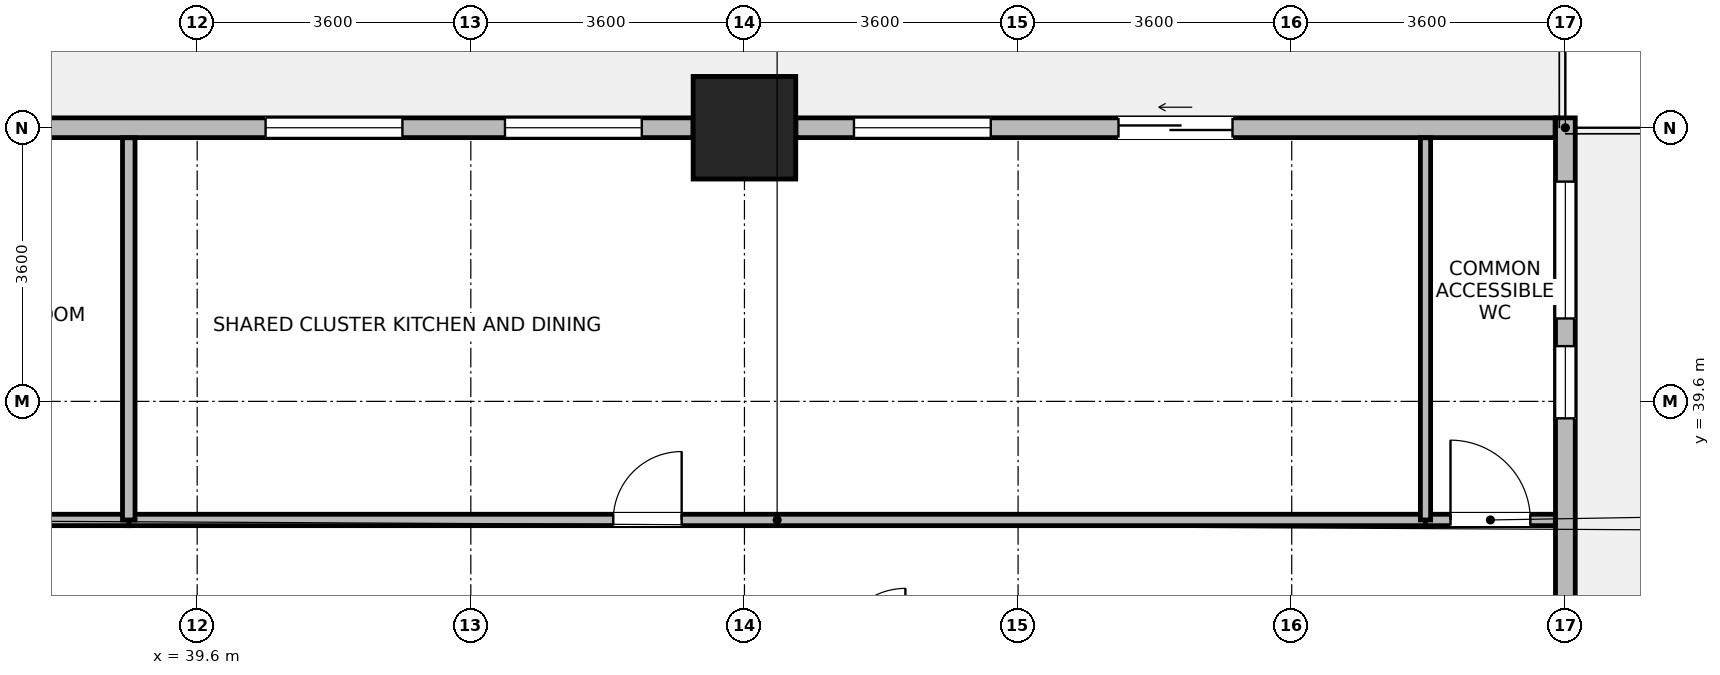
"""IFC4 building model, lengths in metres.
Left out: names, types, materials, properties, quantities, classifications, styles, units other than length and angle.
Written with IfcOpenShell. Run it as: python <this file> out.ifc"""

import sys

from ifc_helpers import new_model, si_unit, direction, frame, frame_2d, origin, origin_2d, place, context, subcontext, project, spatial, rectangle, extrude, source, transform, mapped, element, fill, save


model = new_model("IFC4")
c1 = context("Model", 3, precision=1e-05, world=origin(), true_north=direction((0.0, 1.0)))
c2 = subcontext(c1, "Body", "Model", "MODEL_VIEW")
j1 = project(units=[si_unit("LENGTHUNIT", "METRE"), si_unit("PLANEANGLEUNIT", "RADIAN")], contexts=[c1])
p1 = place(None, origin())
s1 = spatial("IfcSite", under=j1, at=p1, CompositionType="ELEMENT")
p2 = place(p1, origin())
s2 = spatial("IfcBuilding", under=s1, at=p2, CompositionType="ELEMENT")
p3 = place(p2, frame((0.0, 0.0, 29.0)))
s3 = spatial("IfcBuildingStorey", under=s2, at=p3, CompositionType="ELEMENT", Elevation=29.0)
m1 = source(origin(), c2, "Body", "SweptSolid", [
    extrude(rectangle(XDim=1.35, YDim=1.35, at=origin_2d()), origin(), (0.0, 0.0, 1.0), 3.7),
])
p4 = place(p3, frame((46.8, 43.2, 0.0), z_axis=(0.0, 0.0, 1.0), x_axis=(1.0, 0.0, 0.0)))
e1 = element("IfcColumn", 1, at=p4, inside=s3, PredefinedType="COLUMN", context=c2, shape_type="MappedRepresentation", body=[
    mapped(m1, transform((0.0, 0.0, 0.0), x_axis=(1.0, 0.0, 0.0), y_axis=(0.0, 1.0, 0.0), z_axis=(0.0, 0.0, 1.0), scale=1.0)),
])
p5 = place(p3, frame((57.6, 43.33, 0.0), z_axis=(0.0, 0.0, 1.0), x_axis=(0.0, -1.0, 0.0)))
e2 = element("IfcWall", 2, at=p5, inside=s3, PredefinedType="STANDARD", context=c2, shape_type="SweptSolid", body=[
    extrude(rectangle(XDim=6.956, YDim=0.26, at=frame_2d((3.478, 0.0))), origin(), (0.0, 0.0, 1.0), 3.43),
])
p6 = place(p5, frame((0.839, 0.0, 0.85)))
e3 = element("IfcOpeningElement", 3, at=p6, cuts=e2, PredefinedType="OPENING", context=c2, shape_type="SweptSolid", body=[
    extrude(rectangle(XDim=1.8, YDim=1.85, at=frame_2d((0.9, 0.925))), frame((0.0, 0.14, 0.0), z_axis=(0.0, -1.0, 0.0), x_axis=(1.0, 0.0, 0.0)), (0.0, 0.0, 1.0), 0.28),
])
p7 = place(p5, frame((3.003, 0.0, 0.85)))
e4 = element("IfcOpeningElement", 4, at=p7, cuts=e2, PredefinedType="OPENING", context=c2, shape_type="SweptSolid", body=[
    extrude(rectangle(XDim=0.95, YDim=1.75, at=frame_2d((0.475, 0.875))), frame((0.0, 0.14, 0.0), z_axis=(0.0, -1.0, 0.0), x_axis=(1.0, 0.0, 0.0)), (0.0, 0.0, 1.0), 0.28),
])
p8 = place(p3, frame((47.476, 43.2, 0.0), z_axis=(0.0, 0.0, 1.0), x_axis=(1.0, 0.0, 0.0)))
e5 = element("IfcWall", 5, at=p8, inside=s3, PredefinedType="STANDARD", context=c2, shape_type="SweptSolid", body=[
    extrude(rectangle(XDim=9.989, YDim=0.26, at=frame_2d((4.995, 0.0))), origin(), (0.0, 0.0, 1.0), 3.43),
])
p9 = place(p8, frame((4.245, 0.0, 0.0)))
e6 = element("IfcOpeningElement", 6, at=p9, cuts=e5, PredefinedType="OPENING", context=c2, shape_type="SweptSolid", body=[
    extrude(rectangle(XDim=1.5, YDim=2.15, at=frame_2d((0.75, 1.075))), frame((0.0, 0.14, 0.0), z_axis=(0.0, -1.0, 0.0), x_axis=(1.0, 0.0, 0.0)), (0.0, 0.0, 1.0), 0.28),
])
p10 = place(p8, frame((0.765, 0.0, 0.85)))
e7 = element("IfcOpeningElement", 7, at=p10, cuts=e5, PredefinedType="OPENING", context=c2, shape_type="SweptSolid", body=[
    extrude(rectangle(XDim=1.8, YDim=1.85, at=frame_2d((0.9, 0.925))), frame((0.0, 0.14, 0.0), z_axis=(0.0, -1.0, 0.0), x_axis=(1.0, 0.0, 0.0)), (0.0, 0.0, 1.0), 0.28),
])
p11 = place(p3, frame((36.676, 43.2, 0.0), z_axis=(0.0, 0.0, 1.0), x_axis=(1.0, 0.0, 0.0)))
e8 = element("IfcWall", 8, at=p11, inside=s3, PredefinedType="STANDARD", context=c2, shape_type="SweptSolid", body=[
    extrude(rectangle(XDim=9.448, YDim=0.26, at=frame_2d((4.724, 0.0))), origin(), (0.0, 0.0, 1.0), 2.93),
])
p12 = place(p11, frame((3.824, 0.0, 0.85)))
e9 = element("IfcOpeningElement", 9, at=p12, cuts=e8, PredefinedType="OPENING", context=c2, shape_type="SweptSolid", body=[
    extrude(rectangle(XDim=1.8, YDim=1.85, at=frame_2d((0.9, 0.925))), frame((0.0, 0.14, 0.0), z_axis=(0.0, -1.0, 0.0), x_axis=(1.0, 0.0, 0.0)), (0.0, 0.0, 1.0), 0.28),
])
p13 = place(p11, frame((6.973, 0.0, 0.85)))
e10 = element("IfcOpeningElement", 10, at=p13, cuts=e8, PredefinedType="OPENING", context=c2, shape_type="SweptSolid", body=[
    extrude(rectangle(XDim=1.8, YDim=1.85, at=frame_2d((0.9, 0.925))), frame((0.0, 0.14, 0.0), z_axis=(0.0, -1.0, 0.0), x_axis=(1.0, 0.0, 0.0)), (0.0, 0.0, 1.0), 0.28),
])
p14 = place(p3, frame((38.7, 38.04, 0.0), z_axis=(0.0, 0.0, 1.0), x_axis=(1.0, 0.0, 0.0)))
e11 = element("IfcWall", 11, at=p14, inside=s3, PredefinedType="PARTITIONING", context=c2, shape_type="SweptSolid", body=[
    extrude(rectangle(XDim=17.06, YDim=0.15, at=frame_2d((8.53, 0.0))), origin(), (0.0, 0.0, 1.0), 3.43),
])
p15 = place(p14, frame((6.374, 0.0, 0.0)))
e12 = element("IfcOpeningElement", 12, at=p15, cuts=e11, PredefinedType="OPENING", context=c2, shape_type="SweptSolid", body=[
    extrude(rectangle(XDim=0.9, YDim=2.08, at=frame_2d((0.45, 1.04))), frame((0.0, 0.085, 0.0), z_axis=(0.0, -1.0, 0.0), x_axis=(1.0, 0.0, 0.0)), (0.0, 0.0, 1.0), 0.17),
])
p16 = place(p3, frame((29.72, 38.04, 0.0), z_axis=(0.0, 0.0, 1.0), x_axis=(1.0, 0.0, 0.0)))
e13 = element("IfcWall", 13, at=p16, inside=s3, PredefinedType="PARTITIONING", context=c2, shape_type="SweptSolid", body=[
    extrude(rectangle(XDim=8.98, YDim=0.15, at=frame_2d((4.49, 0.0))), origin(), (0.0, 0.0, 1.0), 3.43),
])
p17 = place(p16, frame((4.015, 0.0, 0.0)))
e14 = element("IfcOpeningElement", 14, at=p17, cuts=e13, PredefinedType="OPENING", context=c2, shape_type="SweptSolid", body=[
    extrude(rectangle(XDim=0.95, YDim=2.1, at=frame_2d((0.475, 1.05))), frame((0.0, 0.085, 0.0), z_axis=(0.0, -1.0, 0.0), x_axis=(1.0, 0.0, 0.0)), (0.0, 0.0, 1.0), 0.17),
])
p18 = place(p3, frame((55.76, 38.04, 0.0), z_axis=(0.0, 0.0, 1.0), x_axis=(1.0, 0.0, 0.0)))
e15 = element("IfcWall", 15, at=p18, inside=s3, PredefinedType="PARTITIONING", context=c2, shape_type="SweptSolid", body=[
    extrude(rectangle(XDim=1.708, YDim=0.15, at=frame_2d((0.854, 0.0))), origin(), (0.0, 0.0, 1.0), 3.43),
])
p19 = place(p18, frame((0.329, 0.0, 0.0)))
e16 = element("IfcOpeningElement", 16, at=p19, cuts=e15, PredefinedType="OPENING", context=c2, shape_type="SweptSolid", body=[
    extrude(rectangle(XDim=1.05, YDim=2.12, at=frame_2d((0.525, 1.06))), frame((0.0, 0.085, 0.0), z_axis=(0.0, -1.0, 0.0), x_axis=(1.0, 0.0, 0.0)), (0.0, 0.0, 1.0), 0.17),
])
p20 = place(p3, frame((38.7, 38.04, 0.0), z_axis=(0.0, 0.0, 1.0), x_axis=(0.0, 1.0, 0.0)))
e17 = element("IfcWall", 17, at=p20, inside=s3, PredefinedType="PARTITIONING", context=c2, shape_type="SweptSolid", body=[
    extrude(rectangle(XDim=5.028, YDim=0.165, at=frame_2d((2.514, 0.0))), origin(), (0.0, 0.0, 1.0), 3.43),
])
p21 = place(p3, frame((55.76, 38.04, 0.0), z_axis=(0.0, 0.0, 1.0), x_axis=(0.0, 1.0, 0.0)))
e18 = element("IfcWall", 18, at=p21, inside=s3, PredefinedType="PARTITIONING", context=c2, shape_type="SweptSolid", body=[
    extrude(rectangle(XDim=5.028, YDim=0.135, at=frame_2d((2.514, 0.0))), origin(), (0.0, 0.0, 1.0), 3.43),
])
p22 = place(p6, origin())
e19 = element("IfcWindow", 19, at=p22, inside=s3, PartitioningType="SINGLE_PANEL", PredefinedType="WINDOW", context=c2, shape_type="SweptSolid", body=[
    extrude(rectangle(XDim=1.8, YDim=1.85, at=frame_2d((0.9, 0.925))), frame((0.0, 0.03, 0.0), z_axis=(0.0, -1.0, 0.0), x_axis=(1.0, 0.0, 0.0)), (0.0, 0.0, 1.0), 0.06),
])
fill(e3, e19)
p23 = place(p7, origin())
e20 = element("IfcWindow", 20, at=p23, inside=s3, PartitioningType="SINGLE_PANEL", PredefinedType="WINDOW", context=c2, shape_type="SweptSolid", body=[
    extrude(rectangle(XDim=0.95, YDim=1.75, at=frame_2d((0.475, 0.875))), frame((0.0, 0.03, 0.0), z_axis=(0.0, -1.0, 0.0), x_axis=(1.0, 0.0, 0.0)), (0.0, 0.0, 1.0), 0.06),
])
fill(e4, e20)
p24 = place(p9, origin())
e21 = element("IfcDoor", 21, at=p24, inside=s3, OperationType="SLIDING_TO_LEFT", PredefinedType="DOOR", context=c2, shape_type="SweptSolid", body=[
    extrude(rectangle(XDim=1.5, YDim=2.15, at=frame_2d((0.75, 1.075))), frame((0.0, 0.025, 0.0), z_axis=(0.0, -1.0, 0.0), x_axis=(1.0, 0.0, 0.0)), (0.0, 0.0, 1.0), 0.05),
])
fill(e6, e21)
p25 = place(p10, origin())
e22 = element("IfcWindow", 22, at=p25, inside=s3, PartitioningType="SINGLE_PANEL", PredefinedType="WINDOW", context=c2, shape_type="SweptSolid", body=[
    extrude(rectangle(XDim=1.8, YDim=1.85, at=frame_2d((0.9, 0.925))), frame((0.0, 0.03, 0.0), z_axis=(0.0, -1.0, 0.0), x_axis=(1.0, 0.0, 0.0)), (0.0, 0.0, 1.0), 0.06),
])
fill(e7, e22)
p26 = place(p12, origin())
e23 = element("IfcWindow", 23, at=p26, inside=s3, PartitioningType="SINGLE_PANEL", PredefinedType="WINDOW", context=c2, shape_type="SweptSolid", body=[
    extrude(rectangle(XDim=1.8, YDim=1.85, at=frame_2d((0.9, 0.925))), frame((0.0, 0.03, 0.0), z_axis=(0.0, -1.0, 0.0), x_axis=(1.0, 0.0, 0.0)), (0.0, 0.0, 1.0), 0.06),
])
fill(e9, e23)
p27 = place(p13, origin())
e24 = element("IfcWindow", 24, at=p27, inside=s3, PartitioningType="SINGLE_PANEL", PredefinedType="WINDOW", context=c2, shape_type="SweptSolid", body=[
    extrude(rectangle(XDim=1.8, YDim=1.85, at=frame_2d((0.9, 0.925))), frame((0.0, 0.03, 0.0), z_axis=(0.0, -1.0, 0.0), x_axis=(1.0, 0.0, 0.0)), (0.0, 0.0, 1.0), 0.06),
])
fill(e10, e24)
p28 = place(p15, origin())
e25 = element("IfcDoor", 25, at=p28, inside=s3, OperationType="SINGLE_SWING_RIGHT", PredefinedType="DOOR", context=c2, shape_type="SweptSolid", body=[
    extrude(rectangle(XDim=0.9, YDim=2.08, at=frame_2d((0.45, 1.04))), frame((0.0, 0.025, 0.0), z_axis=(0.0, -1.0, 0.0), x_axis=(1.0, 0.0, 0.0)), (0.0, 0.0, 1.0), 0.05),
])
fill(e12, e25)
p29 = place(p19, origin())
e26 = element("IfcDoor", 26, at=p29, inside=s3, OperationType="SINGLE_SWING_LEFT", PredefinedType="DOOR", context=c2, shape_type="SweptSolid", body=[
    extrude(rectangle(XDim=1.05, YDim=2.12, at=frame_2d((0.525, 1.06))), frame((0.0, 0.025, 0.0), z_axis=(0.0, -1.0, 0.0), x_axis=(1.0, 0.0, 0.0)), (0.0, 0.0, 1.0), 0.05),
])
fill(e16, e26)
save(model, sys.argv[1])
